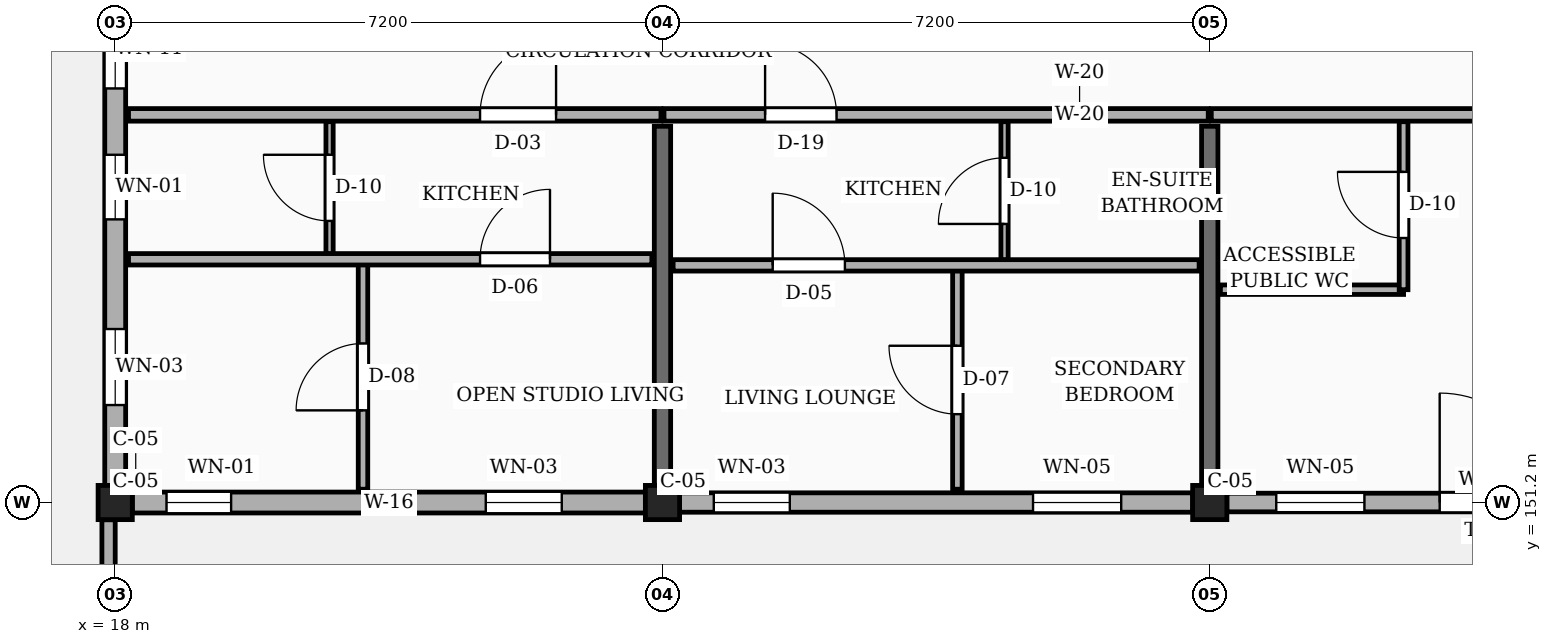
"""IFC4 building model, lengths in metres.
Left out: names, types, materials, properties, quantities, classifications, styles, units other than length and angle.
Written with IfcOpenShell. Run it as: python <this file> out.ifc"""

import sys

from ifc_helpers import new_model, si_unit, direction, frame, frame_2d, origin, origin_2d, place, context, subcontext, project, spatial, rectangle, extrude, element, fill, save


model = new_model("IFC4")
c1 = context("Model", 3, precision=1e-05, world=origin(), true_north=direction((0.0, 1.0)))
c2 = subcontext(c1, "Body", "Model", "MODEL_VIEW")
j1 = project(units=[si_unit("LENGTHUNIT", "METRE"), si_unit("PLANEANGLEUNIT", "RADIAN")], contexts=[c1])
p1 = place(None, origin())
s1 = spatial("IfcSite", under=j1, at=p1, CompositionType="ELEMENT")
p2 = place(p1, origin())
s2 = spatial("IfcBuilding", under=s1, at=p2, CompositionType="ELEMENT")
p3 = place(p2, frame((0.0, 0.0, 36.0)))
s3 = spatial("IfcBuildingStorey", under=s2, at=p3, CompositionType="ELEMENT", Elevation=36.0)
for number, where, z_axis, x_axis in (
    (1, (18.0, 151.2, 0.0), (0.0, 0.0, 1.0), (1.0, 0.0, 0.0)),
    (2, (25.2, 151.2, 0.0), (0.0, 0.0, 1.0), (1.0, 0.0, 0.0)),
    (3, (32.4, 151.2, 0.0), (0.0, 0.0, 1.0), (1.0, 0.0, 0.0)),
):
    element("IfcColumn", number, at=place(p3, frame(where, z_axis=z_axis, x_axis=x_axis)), inside=s3, PredefinedType="COLUMN", context=c2, shape_type="SweptSolid", body=[
        extrude(rectangle(XDim=0.45, YDim=0.45, at=origin_2d()), origin(), (0.0, 0.0, 1.0), 3.15),
    ])
for number, where, z_axis, x_axis in (
    (4, (25.2, 151.425, 0.0), (0.0, 0.0, 1.0), (0.0, 1.0, 0.0)),
    (5, (32.4, 151.425, 0.0), (0.0, 0.0, 1.0), (0.0, 1.0, 0.0)),
):
    element("IfcWall", number, at=place(p3, frame(where, z_axis=z_axis, x_axis=x_axis)), inside=s3, PredefinedType="SOLIDWALL", context=c2, shape_type="SweptSolid", body=[
        extrude(rectangle(XDim=4.725, YDim=0.215, at=frame_2d((2.362, 0.0))), origin(), (0.0, 0.0, 1.0), 2.185),
    ])
p4 = place(p3, frame((18.225, 151.2, 0.0), z_axis=(0.0, 0.0, 1.0), x_axis=(1.0, 0.0, 0.0)))
e6 = element("IfcWall", 6, at=p4, inside=s3, PredefinedType="SOLIDWALL", context=c2, shape_type="SweptSolid", body=[
    extrude(rectangle(XDim=6.75, YDim=0.275, at=frame_2d((3.375, 0.0))), origin(), (0.0, 0.0, 1.0), 2.455),
])
p5 = place(p4, frame((0.45, 0.0, 0.78)))
e7 = element("IfcOpeningElement", 7, at=p5, cuts=e6, PredefinedType="OPENING", context=c2, shape_type="SweptSolid", body=[
    extrude(rectangle(XDim=0.85, YDim=1.15, at=frame_2d((0.425, 0.575))), frame((0.0, 0.147, 0.0), z_axis=(0.0, -1.0, 0.0), x_axis=(1.0, 0.0, 0.0)), (0.0, 0.0, 1.0), 0.295),
])
p6 = place(p4, frame((4.65, 0.0, 0.78)))
e8 = element("IfcOpeningElement", 8, at=p6, cuts=e6, PredefinedType="OPENING", context=c2, shape_type="SweptSolid", body=[
    extrude(rectangle(XDim=1.0, YDim=1.15, at=frame_2d((0.5, 0.575))), frame((0.0, 0.147, 0.0), z_axis=(0.0, -1.0, 0.0), x_axis=(1.0, 0.0, 0.0)), (0.0, 0.0, 1.0), 0.295),
])
p7 = place(p3, frame((25.425, 151.2, 0.0), z_axis=(0.0, 0.0, 1.0), x_axis=(1.0, 0.0, 0.0)))
e9 = element("IfcWall", 9, at=p7, inside=s3, PredefinedType="SOLIDWALL", context=c2, shape_type="SweptSolid", body=[
    extrude(rectangle(XDim=6.75, YDim=0.255, at=frame_2d((3.375, 0.0))), origin(), (0.0, 0.0, 1.0), 2.455),
])
p8 = place(p7, frame((0.45, 0.0, 0.78)))
e10 = element("IfcOpeningElement", 10, at=p8, cuts=e9, PredefinedType="OPENING", context=c2, shape_type="SweptSolid", body=[
    extrude(rectangle(XDim=1.0, YDim=1.15, at=frame_2d((0.5, 0.575))), frame((0.0, 0.137, 0.0), z_axis=(0.0, -1.0, 0.0), x_axis=(1.0, 0.0, 0.0)), (0.0, 0.0, 1.0), 0.275),
])
p9 = place(p7, frame((4.65, 0.0, 0.78)))
e11 = element("IfcOpeningElement", 11, at=p9, cuts=e9, PredefinedType="OPENING", context=c2, shape_type="SweptSolid", body=[
    extrude(rectangle(XDim=1.16, YDim=1.15, at=frame_2d((0.58, 0.575))), frame((0.0, 0.137, 0.0), z_axis=(0.0, -1.0, 0.0), x_axis=(1.0, 0.0, 0.0)), (0.0, 0.0, 1.0), 0.275),
])
p10 = place(p3, frame((32.625, 151.2, 0.0), z_axis=(0.0, 0.0, 1.0), x_axis=(1.0, 0.0, 0.0)))
e12 = element("IfcWall", 12, at=p10, inside=s3, PredefinedType="SOLIDWALL", context=c2, shape_type="SweptSolid", body=[
    extrude(rectangle(XDim=6.75, YDim=0.245, at=frame_2d((3.375, 0.0))), origin(), (0.0, 0.0, 1.0), 2.455),
])
p11 = place(p10, frame((2.8, 0.0, 0.0)))
e13 = element("IfcOpeningElement", 13, at=p11, cuts=e12, PredefinedType="OPENING", context=c2, shape_type="SweptSolid", body=[
    extrude(rectangle(XDim=1.44, YDim=2.12, at=frame_2d((0.72, 1.06))), frame((0.0, 0.133, 0.0), z_axis=(0.0, -1.0, 0.0), x_axis=(1.0, 0.0, 0.0)), (0.0, 0.0, 1.0), 0.265),
])
p12 = place(p10, frame((0.65, 0.0, 0.78)))
e14 = element("IfcOpeningElement", 14, at=p12, cuts=e12, PredefinedType="OPENING", context=c2, shape_type="SweptSolid", body=[
    extrude(rectangle(XDim=1.16, YDim=1.15, at=frame_2d((0.58, 0.575))), frame((0.0, 0.133, 0.0), z_axis=(0.0, -1.0, 0.0), x_axis=(1.0, 0.0, 0.0)), (0.0, 0.0, 1.0), 0.265),
])
p13 = place(p3, frame((18.0, 158.175, 0.0), z_axis=(0.0, 0.0, 1.0), x_axis=(0.0, -1.0, 0.0)))
e15 = element("IfcWall", 15, at=p13, inside=s3, PredefinedType="SOLIDWALL", context=c2, shape_type="SweptSolid", body=[
    extrude(rectangle(XDim=6.75, YDim=0.275, at=frame_2d((3.375, 0.0))), origin(), (0.0, 0.0, 1.0), 2.455),
])
p14 = place(p13, frame((0.488, 0.0, 0.78)))
e16 = element("IfcOpeningElement", 16, at=p14, cuts=e15, PredefinedType="OPENING", context=c2, shape_type="SweptSolid", body=[
    extrude(rectangle(XDim=1.04, YDim=1.26, at=frame_2d((0.52, 0.63))), frame((0.0, 0.147, 0.0), z_axis=(0.0, -1.0, 0.0), x_axis=(1.0, 0.0, 0.0)), (0.0, 0.0, 1.0), 0.295),
])
p15 = place(p13, frame((2.4, 0.0, 0.78)))
e17 = element("IfcOpeningElement", 17, at=p15, cuts=e15, PredefinedType="OPENING", context=c2, shape_type="SweptSolid", body=[
    extrude(rectangle(XDim=0.85, YDim=1.15, at=frame_2d((0.425, 0.575))), frame((0.0, 0.147, 0.0), z_axis=(0.0, -1.0, 0.0), x_axis=(1.0, 0.0, 0.0)), (0.0, 0.0, 1.0), 0.295),
])
p16 = place(p13, frame((4.692, 0.0, 0.78)))
e18 = element("IfcOpeningElement", 18, at=p16, cuts=e15, PredefinedType="OPENING", context=c2, shape_type="SweptSolid", body=[
    extrude(rectangle(XDim=1.0, YDim=1.15, at=frame_2d((0.5, 0.575))), frame((0.0, 0.147, 0.0), z_axis=(0.0, -1.0, 0.0), x_axis=(1.0, 0.0, 0.0)), (0.0, 0.0, 1.0), 0.295),
])
p17 = place(p3, frame((17.913, 144.175, 0.0), z_axis=(0.0, 0.0, 1.0), x_axis=(0.0, 1.0, 0.0)))
e19 = element("IfcWall", 19, at=p17, inside=s3, PredefinedType="PARAPET", context=c2, shape_type="SweptSolid", body=[
    extrude(rectangle(XDim=6.798, YDim=0.175, at=frame_2d((3.399, 0.0))), origin(), (0.0, 0.0, 1.0), 1.1),
])
p18 = place(p3, frame((18.175, 156.3, 0.0), z_axis=(0.0, 0.0, 1.0), x_axis=(1.0, 0.0, 0.0)))
e20 = element("IfcWall", 20, at=p18, inside=s3, PredefinedType="PARTITIONING", context=c2, shape_type="SweptSolid", body=[
    extrude(rectangle(XDim=7.005, YDim=0.165, at=frame_2d((3.502, 0.0))), origin(), (0.0, 0.0, 1.0), 2.32),
])
p19 = place(p18, frame((4.625, 0.0, 0.0)))
e21 = element("IfcOpeningElement", 21, at=p19, cuts=e20, PredefinedType="OPENING", context=c2, shape_type="SweptSolid", body=[
    extrude(rectangle(XDim=1.0, YDim=2.15, at=frame_2d((0.5, 1.075))), frame((0.0, 0.093, 0.0), z_axis=(0.0, -1.0, 0.0), x_axis=(1.0, 0.0, 0.0)), (0.0, 0.0, 1.0), 0.185),
])
p20 = place(p3, frame((25.22, 156.3, 0.0), z_axis=(0.0, 0.0, 1.0), x_axis=(1.0, 0.0, 0.0)))
e22 = element("IfcWall", 22, at=p20, inside=s3, PredefinedType="PARTITIONING", context=c2, shape_type="SweptSolid", body=[
    extrude(rectangle(XDim=7.16, YDim=0.165, at=frame_2d((3.58, 0.0))), origin(), (0.0, 0.0, 1.0), 2.32),
])
p21 = place(p20, frame((1.33, 0.0, 0.0)))
e23 = element("IfcOpeningElement", 23, at=p21, cuts=e22, PredefinedType="OPENING", context=c2, shape_type="SweptSolid", body=[
    extrude(rectangle(XDim=0.94, YDim=2.12, at=frame_2d((0.47, 1.06))), frame((0.0, 0.093, 0.0), z_axis=(0.0, -1.0, 0.0), x_axis=(1.0, 0.0, 0.0)), (0.0, 0.0, 1.0), 0.185),
])
p22 = place(p3, frame((32.42, 156.3, 0.0), z_axis=(0.0, 0.0, 1.0), x_axis=(1.0, 0.0, 0.0)))
e24 = element("IfcWall", 24, at=p22, inside=s3, PredefinedType="PARTITIONING", context=c2, shape_type="SweptSolid", body=[
    extrude(rectangle(XDim=7.16, YDim=0.165, at=frame_2d((3.58, 0.0))), origin(), (0.0, 0.0, 1.0), 2.32),
])
p23 = place(p22, frame((4.33, 0.0, 0.0)))
e25 = element("IfcOpeningElement", 25, at=p23, cuts=e24, PredefinedType="OPENING", context=c2, shape_type="SweptSolid", body=[
    extrude(rectangle(XDim=1.1, YDim=2.15, at=frame_2d((0.55, 1.075))), frame((0.0, 0.093, 0.0), z_axis=(0.0, -1.0, 0.0), x_axis=(1.0, 0.0, 0.0)), (0.0, 0.0, 1.0), 0.185),
])
p24 = place(p3, frame((21.26, 151.375, 0.0), z_axis=(0.0, 0.0, 1.0), x_axis=(0.0, 1.0, 0.0)))
e26 = element("IfcWall", 26, at=p24, inside=s3, PredefinedType="PARTITIONING", context=c2, shape_type="SweptSolid", body=[
    extrude(rectangle(XDim=2.955, YDim=0.125, at=frame_2d((1.478, 0.0))), origin(), (0.0, 0.0, 1.0), 2.32),
])
p25 = place(p24, frame((1.038, 0.0, 0.0)))
e27 = element("IfcOpeningElement", 27, at=p25, cuts=e26, PredefinedType="OPENING", context=c2, shape_type="SweptSolid", body=[
    extrude(rectangle(XDim=0.88, YDim=2.08, at=frame_2d((0.44, 1.04))), frame((0.0, 0.073, 0.0), z_axis=(0.0, -1.0, 0.0), x_axis=(1.0, 0.0, 0.0)), (0.0, 0.0, 1.0), 0.145),
])
p26 = place(p3, frame((20.82, 154.47, 0.0), z_axis=(0.0, 0.0, 1.0), x_axis=(0.0, 1.0, 0.0)))
e28 = element("IfcWall", 28, at=p26, inside=s3, PredefinedType="PARTITIONING", context=c2, shape_type="SweptSolid", body=[
    extrude(rectangle(XDim=1.74, YDim=0.095, at=frame_2d((0.87, 0.0))), origin(), (0.0, 0.0, 1.0), 2.32),
])
p27 = place(p26, frame((0.435, 0.0, 0.0)))
e29 = element("IfcOpeningElement", 29, at=p27, cuts=e28, PredefinedType="OPENING", context=c2, shape_type="SweptSolid", body=[
    extrude(rectangle(XDim=0.87, YDim=2.05, at=frame_2d((0.435, 1.025))), frame((0.0, 0.058, 0.0), z_axis=(0.0, -1.0, 0.0), x_axis=(1.0, 0.0, 0.0)), (0.0, 0.0, 1.0), 0.115),
])
p28 = place(p3, frame((18.175, 154.4, 0.0), z_axis=(0.0, 0.0, 1.0), x_axis=(1.0, 0.0, 0.0)))
e30 = element("IfcWall", 30, at=p28, inside=s3, PredefinedType="PARTITIONING", context=c2, shape_type="SweptSolid", body=[
    extrude(rectangle(XDim=6.885, YDim=0.15, at=frame_2d((3.442, 0.0))), origin(), (0.0, 0.0, 1.0), 2.32),
])
p29 = place(p28, frame((4.625, 0.0, 0.0)))
e31 = element("IfcOpeningElement", 31, at=p29, cuts=e30, PredefinedType="OPENING", context=c2, shape_type="SweptSolid", body=[
    extrude(rectangle(XDim=0.92, YDim=2.1, at=frame_2d((0.46, 1.05))), frame((0.0, 0.085, 0.0), z_axis=(0.0, -1.0, 0.0), x_axis=(1.0, 0.0, 0.0)), (0.0, 0.0, 1.0), 0.17),
])
p30 = place(p3, frame((29.08, 151.375, 0.0), z_axis=(0.0, 0.0, 1.0), x_axis=(0.0, 1.0, 0.0)))
e32 = element("IfcWall", 32, at=p30, inside=s3, PredefinedType="PARTITIONING", context=c2, shape_type="SweptSolid", body=[
    extrude(rectangle(XDim=2.875, YDim=0.125, at=frame_2d((1.438, 0.0))), origin(), (0.0, 0.0, 1.0), 2.32),
])
p31 = place(p30, frame((0.988, 0.0, 0.0)))
e33 = element("IfcOpeningElement", 33, at=p31, cuts=e32, PredefinedType="OPENING", context=c2, shape_type="SweptSolid", body=[
    extrude(rectangle(XDim=0.9, YDim=2.1, at=frame_2d((0.45, 1.05))), frame((0.0, 0.073, 0.0), z_axis=(0.0, -1.0, 0.0), x_axis=(1.0, 0.0, 0.0)), (0.0, 0.0, 1.0), 0.145),
])
p32 = place(p3, frame((29.7, 154.39, 0.0), z_axis=(0.0, 0.0, 1.0), x_axis=(0.0, 1.0, 0.0)))
e34 = element("IfcWall", 34, at=p32, inside=s3, PredefinedType="PARTITIONING", context=c2, shape_type="SweptSolid", body=[
    extrude(rectangle(XDim=1.82, YDim=0.095, at=frame_2d((0.91, 0.0))), origin(), (0.0, 0.0, 1.0), 2.32),
])
p33 = place(p32, frame((0.475, 0.0, 0.0)))
e35 = element("IfcOpeningElement", 35, at=p33, cuts=e34, PredefinedType="OPENING", context=c2, shape_type="SweptSolid", body=[
    extrude(rectangle(XDim=0.87, YDim=2.05, at=frame_2d((0.435, 1.025))), frame((0.0, 0.058, 0.0), z_axis=(0.0, -1.0, 0.0), x_axis=(1.0, 0.0, 0.0)), (0.0, 0.0, 1.0), 0.115),
])
p34 = place(p3, frame((25.34, 154.32, 0.0), z_axis=(0.0, 0.0, 1.0), x_axis=(1.0, 0.0, 0.0)))
e36 = element("IfcWall", 36, at=p34, inside=s3, PredefinedType="PARTITIONING", context=c2, shape_type="SweptSolid", body=[
    extrude(rectangle(XDim=6.92, YDim=0.15, at=frame_2d((3.46, 0.0))), origin(), (0.0, 0.0, 1.0), 2.32),
])
p35 = place(p34, frame((1.31, 0.0, 0.0)))
e37 = element("IfcOpeningElement", 37, at=p35, cuts=e36, PredefinedType="OPENING", context=c2, shape_type="SweptSolid", body=[
    extrude(rectangle(XDim=0.95, YDim=2.1, at=frame_2d((0.475, 1.05))), frame((0.0, 0.085, 0.0), z_axis=(0.0, -1.0, 0.0), x_axis=(1.0, 0.0, 0.0)), (0.0, 0.0, 1.0), 0.17),
])
p36 = place(p3, frame((32.54, 154.0, 0.0), z_axis=(0.0, 0.0, 1.0), x_axis=(1.0, 0.0, 0.0)))
e38 = element("IfcWall", 38, at=p36, inside=s3, PredefinedType="PARTITIONING", context=c2, shape_type="SweptSolid", body=[
    extrude(rectangle(XDim=2.41, YDim=0.125, at=frame_2d((1.205, 0.0))), origin(), (0.0, 0.0, 1.0), 2.32),
])
p37 = place(p3, frame((34.95, 154.0, 0.0), z_axis=(0.0, 0.0, 1.0), x_axis=(0.0, 1.0, 0.0)))
e39 = element("IfcWall", 39, at=p37, inside=s3, PredefinedType="PARTITIONING", context=c2, shape_type="SweptSolid", body=[
    extrude(rectangle(XDim=2.21, YDim=0.115, at=frame_2d((1.105, 0.0))), origin(), (0.0, 0.0, 1.0), 2.32),
])
p38 = place(p37, frame((0.68, 0.0, 0.0)))
e40 = element("IfcOpeningElement", 40, at=p38, cuts=e39, PredefinedType="OPENING", context=c2, shape_type="SweptSolid", body=[
    extrude(rectangle(XDim=0.87, YDim=2.05, at=frame_2d((0.435, 1.025))), frame((0.0, 0.067, 0.0), z_axis=(0.0, -1.0, 0.0), x_axis=(1.0, 0.0, 0.0)), (0.0, 0.0, 1.0), 0.135),
])
p39 = place(p5, origin())
e41 = element("IfcWindow", 41, at=p39, inside=s3, PartitioningType="SINGLE_PANEL", PredefinedType="WINDOW", context=c2, shape_type="SweptSolid", body=[
    extrude(rectangle(XDim=0.85, YDim=1.15, at=frame_2d((0.425, 0.575))), frame((0.0, 0.03, 0.0), z_axis=(0.0, -1.0, 0.0), x_axis=(1.0, 0.0, 0.0)), (0.0, 0.0, 1.0), 0.06),
])
fill(e7, e41)
p40 = place(p6, origin())
e42 = element("IfcWindow", 42, at=p40, inside=s3, PartitioningType="SINGLE_PANEL", PredefinedType="WINDOW", context=c2, shape_type="SweptSolid", body=[
    extrude(rectangle(XDim=1.0, YDim=1.15, at=frame_2d((0.5, 0.575))), frame((0.0, 0.03, 0.0), z_axis=(0.0, -1.0, 0.0), x_axis=(1.0, 0.0, 0.0)), (0.0, 0.0, 1.0), 0.06),
])
fill(e8, e42)
p41 = place(p8, origin())
e43 = element("IfcWindow", 43, at=p41, inside=s3, PartitioningType="SINGLE_PANEL", PredefinedType="WINDOW", context=c2, shape_type="SweptSolid", body=[
    extrude(rectangle(XDim=1.0, YDim=1.15, at=frame_2d((0.5, 0.575))), frame((0.0, 0.03, 0.0), z_axis=(0.0, -1.0, 0.0), x_axis=(1.0, 0.0, 0.0)), (0.0, 0.0, 1.0), 0.06),
])
fill(e10, e43)
p42 = place(p9, origin())
e44 = element("IfcWindow", 44, at=p42, inside=s3, PartitioningType="SINGLE_PANEL", PredefinedType="WINDOW", context=c2, shape_type="SweptSolid", body=[
    extrude(rectangle(XDim=1.16, YDim=1.15, at=frame_2d((0.58, 0.575))), frame((0.0, 0.03, 0.0), z_axis=(0.0, -1.0, 0.0), x_axis=(1.0, 0.0, 0.0)), (0.0, 0.0, 1.0), 0.06),
])
fill(e11, e44)
p43 = place(p11, frame((1.44, 0.0, 0.0), z_axis=(0.0, 0.0, 1.0), x_axis=(-1.0, 0.0, 0.0)))
e45 = element("IfcDoor", 45, at=p43, inside=s3, OperationType="SINGLE_SWING_LEFT", PredefinedType="DOOR", context=c2, shape_type="SweptSolid", body=[
    extrude(rectangle(XDim=1.44, YDim=2.12, at=frame_2d((0.72, 1.06))), frame((0.0, 0.025, 0.0), z_axis=(0.0, -1.0, 0.0), x_axis=(1.0, 0.0, 0.0)), (0.0, 0.0, 1.0), 0.05),
])
fill(e13, e45)
p44 = place(p12, origin())
e46 = element("IfcWindow", 46, at=p44, inside=s3, PartitioningType="SINGLE_PANEL", PredefinedType="WINDOW", context=c2, shape_type="SweptSolid", body=[
    extrude(rectangle(XDim=1.16, YDim=1.15, at=frame_2d((0.58, 0.575))), frame((0.0, 0.03, 0.0), z_axis=(0.0, -1.0, 0.0), x_axis=(1.0, 0.0, 0.0)), (0.0, 0.0, 1.0), 0.06),
])
fill(e14, e46)
p45 = place(p14, origin())
e47 = element("IfcWindow", 47, at=p45, inside=s3, PartitioningType="SINGLE_PANEL", PredefinedType="WINDOW", context=c2, shape_type="SweptSolid", body=[
    extrude(rectangle(XDim=1.04, YDim=1.26, at=frame_2d((0.52, 0.63))), frame((0.0, 0.03, 0.0), z_axis=(0.0, -1.0, 0.0), x_axis=(1.0, 0.0, 0.0)), (0.0, 0.0, 1.0), 0.06),
])
fill(e16, e47)
p46 = place(p15, origin())
e48 = element("IfcWindow", 48, at=p46, inside=s3, PartitioningType="SINGLE_PANEL", PredefinedType="WINDOW", context=c2, shape_type="SweptSolid", body=[
    extrude(rectangle(XDim=0.85, YDim=1.15, at=frame_2d((0.425, 0.575))), frame((0.0, 0.03, 0.0), z_axis=(0.0, -1.0, 0.0), x_axis=(1.0, 0.0, 0.0)), (0.0, 0.0, 1.0), 0.06),
])
fill(e17, e48)
p47 = place(p16, origin())
e49 = element("IfcWindow", 49, at=p47, inside=s3, PartitioningType="SINGLE_PANEL", PredefinedType="WINDOW", context=c2, shape_type="SweptSolid", body=[
    extrude(rectangle(XDim=1.0, YDim=1.15, at=frame_2d((0.5, 0.575))), frame((0.0, 0.03, 0.0), z_axis=(0.0, -1.0, 0.0), x_axis=(1.0, 0.0, 0.0)), (0.0, 0.0, 1.0), 0.06),
])
fill(e18, e49)
p48 = place(p19, origin())
e50 = element("IfcDoor", 50, at=p48, inside=s3, OperationType="SINGLE_SWING_RIGHT", PredefinedType="DOOR", context=c2, shape_type="SweptSolid", body=[
    extrude(rectangle(XDim=1.0, YDim=2.15, at=frame_2d((0.5, 1.075))), frame((0.0, 0.025, 0.0), z_axis=(0.0, -1.0, 0.0), x_axis=(1.0, 0.0, 0.0)), (0.0, 0.0, 1.0), 0.05),
])
fill(e21, e50)
p49 = place(p21, origin())
e51 = element("IfcDoor", 51, at=p49, inside=s3, OperationType="SINGLE_SWING_LEFT", PredefinedType="DOOR", context=c2, shape_type="SweptSolid", body=[
    extrude(rectangle(XDim=0.94, YDim=2.12, at=frame_2d((0.47, 1.06))), frame((0.0, 0.025, 0.0), z_axis=(0.0, -1.0, 0.0), x_axis=(1.0, 0.0, 0.0)), (0.0, 0.0, 1.0), 0.05),
])
fill(e23, e51)
p50 = place(p25, origin())
e52 = element("IfcDoor", 52, at=p50, inside=s3, OperationType="SINGLE_SWING_LEFT", PredefinedType="DOOR", context=c2, shape_type="SweptSolid", body=[
    extrude(rectangle(XDim=0.88, YDim=2.08, at=frame_2d((0.44, 1.04))), frame((0.0, 0.025, 0.0), z_axis=(0.0, -1.0, 0.0), x_axis=(1.0, 0.0, 0.0)), (0.0, 0.0, 1.0), 0.05),
])
fill(e27, e52)
p51 = place(p27, origin())
e53 = element("IfcDoor", 53, at=p51, inside=s3, OperationType="SINGLE_SWING_RIGHT", PredefinedType="DOOR", context=c2, shape_type="SweptSolid", body=[
    extrude(rectangle(XDim=0.87, YDim=2.05, at=frame_2d((0.435, 1.025))), frame((0.0, 0.025, 0.0), z_axis=(0.0, -1.0, 0.0), x_axis=(1.0, 0.0, 0.0)), (0.0, 0.0, 1.0), 0.05),
])
fill(e29, e53)
p52 = place(p29, origin())
e54 = element("IfcDoor", 54, at=p52, inside=s3, OperationType="SINGLE_SWING_RIGHT", PredefinedType="DOOR", context=c2, shape_type="SweptSolid", body=[
    extrude(rectangle(XDim=0.92, YDim=2.1, at=frame_2d((0.46, 1.05))), frame((0.0, 0.025, 0.0), z_axis=(0.0, -1.0, 0.0), x_axis=(1.0, 0.0, 0.0)), (0.0, 0.0, 1.0), 0.05),
])
fill(e31, e54)
p53 = place(p31, origin())
e55 = element("IfcDoor", 55, at=p53, inside=s3, OperationType="SINGLE_SWING_RIGHT", PredefinedType="DOOR", context=c2, shape_type="SweptSolid", body=[
    extrude(rectangle(XDim=0.9, YDim=2.1, at=frame_2d((0.45, 1.05))), frame((0.0, 0.025, 0.0), z_axis=(0.0, -1.0, 0.0), x_axis=(1.0, 0.0, 0.0)), (0.0, 0.0, 1.0), 0.05),
])
fill(e33, e55)
p54 = place(p33, origin())
e56 = element("IfcDoor", 56, at=p54, inside=s3, OperationType="SINGLE_SWING_LEFT", PredefinedType="DOOR", context=c2, shape_type="SweptSolid", body=[
    extrude(rectangle(XDim=0.87, YDim=2.05, at=frame_2d((0.435, 1.025))), frame((0.0, 0.025, 0.0), z_axis=(0.0, -1.0, 0.0), x_axis=(1.0, 0.0, 0.0)), (0.0, 0.0, 1.0), 0.05),
])
fill(e35, e56)
p55 = place(p35, origin())
e57 = element("IfcDoor", 57, at=p55, inside=s3, OperationType="SINGLE_SWING_LEFT", PredefinedType="DOOR", context=c2, shape_type="SweptSolid", body=[
    extrude(rectangle(XDim=0.95, YDim=2.1, at=frame_2d((0.475, 1.05))), frame((0.0, 0.025, 0.0), z_axis=(0.0, -1.0, 0.0), x_axis=(1.0, 0.0, 0.0)), (0.0, 0.0, 1.0), 0.05),
])
fill(e37, e57)
p56 = place(p38, origin())
e58 = element("IfcDoor", 58, at=p56, inside=s3, OperationType="SINGLE_SWING_RIGHT", PredefinedType="DOOR", context=c2, shape_type="SweptSolid", body=[
    extrude(rectangle(XDim=0.87, YDim=2.05, at=frame_2d((0.435, 1.025))), frame((0.0, 0.025, 0.0), z_axis=(0.0, -1.0, 0.0), x_axis=(1.0, 0.0, 0.0)), (0.0, 0.0, 1.0), 0.05),
])
fill(e40, e58)
save(model, sys.argv[1])
